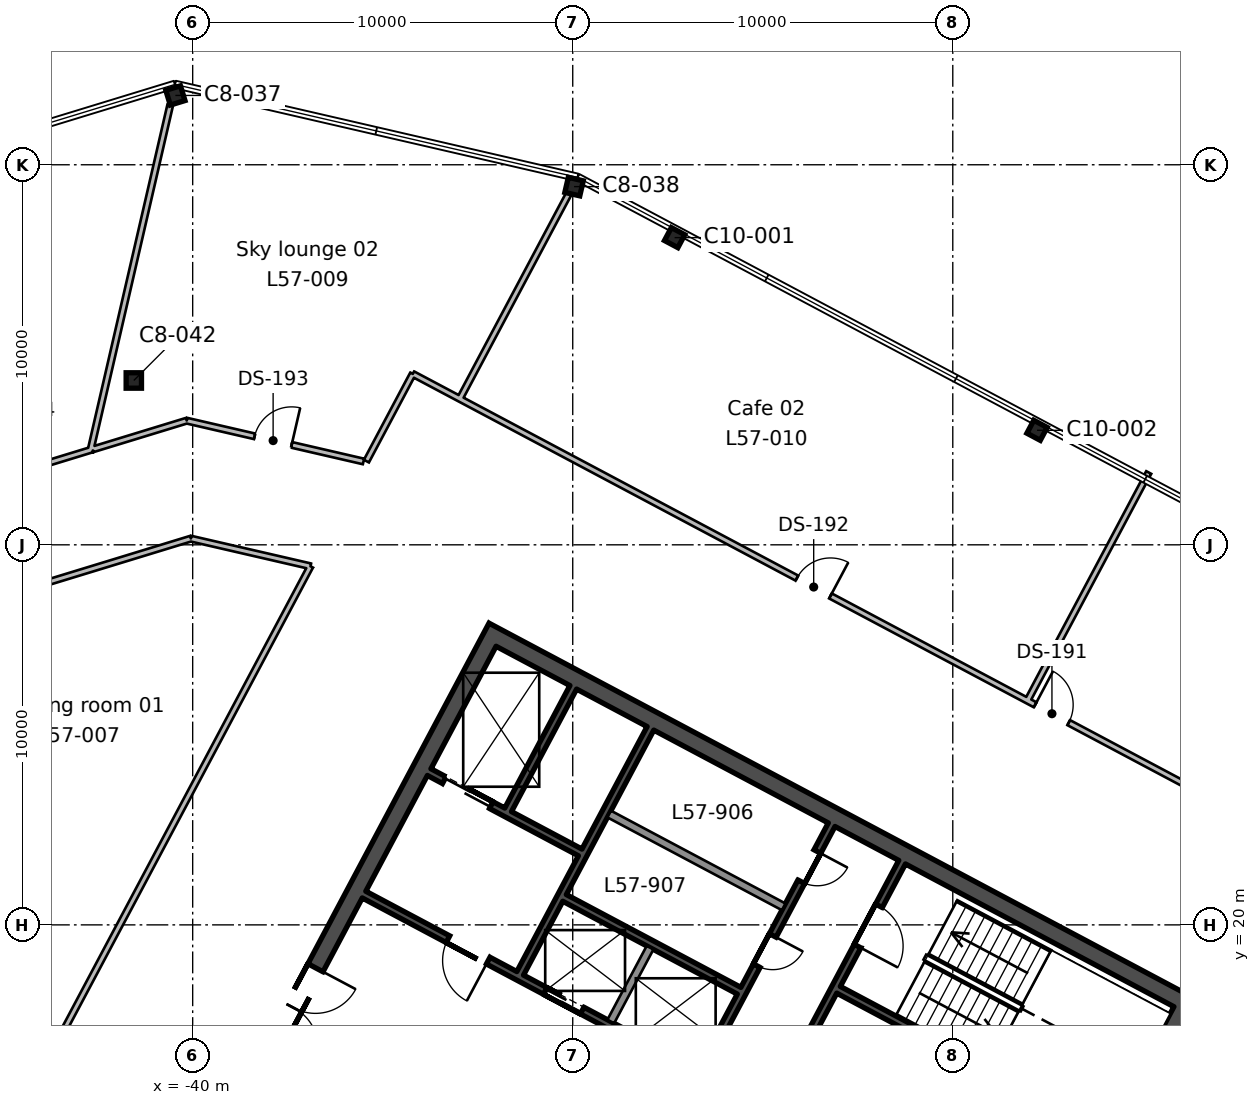
"""IFC4 building model, lengths in metres.
Left out: names, types, materials, properties, quantities, classifications, styles, units other than length and angle.
Written with IfcOpenShell. Run it as: python <this file> out.ifc"""

import sys

from ifc_helpers import new_model, si_unit, direction, frame, frame_2d, origin, origin_2d, place, context, subcontext, project, spatial, rectangle, i_section, extrude, element, fill, save


model = new_model("IFC4")
c1 = context("Model", 3, precision=1e-05, world=origin(), true_north=direction((0.0, 1.0)))
c2 = subcontext(c1, "Body", "Model", "MODEL_VIEW")
j1 = project(units=[si_unit("LENGTHUNIT", "METRE"), si_unit("PLANEANGLEUNIT", "RADIAN")], contexts=[c1])
p1 = place(None, origin())
s1 = spatial("IfcSite", under=j1, at=p1, CompositionType="ELEMENT")
p2 = place(p1, origin())
s2 = spatial("IfcBuilding", under=s1, at=p2, CompositionType="ELEMENT")
p3 = place(p2, frame((0.0, 0.0, 258.0)))
s3 = spatial("IfcBuildingStorey", under=s2, at=p3, CompositionType="ELEMENT", Elevation=258.0)
p4 = place(p3, frame((-17.783, 33.013, 0.0), z_axis=(0.0, 0.0, 1.0), x_axis=(-0.882947592859, 0.469471562786, 0.0)))
e1 = element("IfcColumn", 1, at=p4, inside=s3, PredefinedType="COLUMN", context=c2, shape_type="SweptSolid", body=[
    extrude(i_section(OverallWidth=0.399, OverallDepth=0.386, WebThickness=0.021, FlangeThickness=0.033, FilletRadius=0.015, at=origin_2d()), origin(), (0.0, 0.0, 1.0), 3.9),
])
p5 = place(p3, frame((-41.549, 34.324, 0.0), z_axis=(0.0, 0.0, 1.0), x_axis=(1.0, 0.0, 0.0)))
e2 = element("IfcColumn", 2, at=p5, inside=s3, PredefinedType="COLUMN", context=c2, shape_type="SweptSolid", body=[
    extrude(i_section(OverallWidth=0.404, OverallDepth=0.406, WebThickness=0.027, FlangeThickness=0.044, FilletRadius=0.015, at=origin_2d()), origin(), (0.0, 0.0, 1.0), 3.9),
])
p6 = place(p3, frame((-27.319, 38.083, 0.0), z_axis=(0.0, 0.0, 1.0), x_axis=(-0.882947592859, 0.469471562786, 0.0)))
e3 = element("IfcColumn", 3, at=p6, inside=s3, PredefinedType="COLUMN", context=c2, shape_type="SweptSolid", body=[
    extrude(i_section(OverallWidth=0.399, OverallDepth=0.386, WebThickness=0.021, FlangeThickness=0.033, FilletRadius=0.015, at=origin_2d()), origin(), (0.0, 0.0, 1.0), 3.9),
])
for number, where, z_axis, x_axis in (
    (4, (-29.965, 39.425, 0.0), (0.0, 0.0, 1.0), (-0.974, 0.225, 0.0)),
    (5, (-40.455, 41.824, 0.0), (0.0, 0.0, 1.0), (-0.956, -0.292, 0.0)),
):
    element("IfcColumn", number, at=place(p3, frame(where, z_axis=z_axis, x_axis=x_axis)), inside=s3, PredefinedType="COLUMN", context=c2, shape_type="SweptSolid", body=[
        extrude(i_section(OverallWidth=0.404, OverallDepth=0.406, WebThickness=0.027, FlangeThickness=0.044, FilletRadius=0.015, at=origin_2d()), origin(), (0.0, 0.0, 1.0), 3.9),
    ])
p7 = place(p3, frame((-13.771, 18.138, 0.0), z_axis=(0.0, 0.0, 1.0), x_axis=(-0.469467968382, -0.882949504028, 0.0)))
e6 = element("IfcWall", 6, at=p7, inside=s3, PredefinedType="SHEAR", context=c2, shape_type="SweptSolid", body=[
    extrude(rectangle(XDim=19.1, YDim=0.45, at=frame_2d((9.55, 0.0))), origin(), (0.0, 0.0, 1.0), 3.9),
])
p8 = place(p7, frame((6.55, 0.0, 0.0)))
e7 = element("IfcOpeningElement", 7, at=p8, cuts=e6, PredefinedType="OPENING", context=c2, shape_type="SweptSolid", body=[
    extrude(rectangle(XDim=2.4, YDim=2.4, at=frame_2d((1.2, 1.2))), frame((0.0, 0.235, 0.0), z_axis=(0.0, -1.0, 0.0), x_axis=(1.0, 0.0, 0.0)), (0.0, 0.0, 1.0), 0.47),
])
p9 = place(p3, frame((-32.004, 27.833, 0.0), z_axis=(0.0, 0.0, 1.0), x_axis=(-0.469467968382, -0.882949504028, 0.0)))
e8 = element("IfcWall", 8, at=p9, inside=s3, PredefinedType="SHEAR", context=c2, shape_type="SweptSolid", body=[
    extrude(rectangle(XDim=19.1, YDim=0.45, at=frame_2d((9.55, 0.0))), origin(), (0.0, 0.0, 1.0), 3.9),
])
p10 = place(p9, frame((10.15, 0.0, 0.0)))
e9 = element("IfcOpeningElement", 9, at=p10, cuts=e8, PredefinedType="OPENING", context=c2, shape_type="SweptSolid", body=[
    extrude(rectangle(XDim=2.4, YDim=2.4, at=frame_2d((1.2, 1.2))), frame((0.0, 0.235, 0.0), z_axis=(0.0, -1.0, 0.0), x_axis=(1.0, 0.0, 0.0)), (0.0, 0.0, 1.0), 0.47),
])
p11 = place(p3, frame((-14.076, 18.045, 0.0), z_axis=(0.0, 0.0, 1.0), x_axis=(-0.882947755831, 0.46947125628, 0.0)))
e10 = element("IfcWall", 10, at=p11, inside=s3, PredefinedType="SHEAR", context=c2, shape_type="SweptSolid", body=[
    extrude(rectangle(XDim=20.2, YDim=0.45, at=frame_2d((10.1, 0.0))), origin(), (0.0, 0.0, 1.0), 3.9),
])
p12 = place(p3, frame((-21.333, 21.649, 0.0), z_axis=(0.0, 0.0, 1.0), x_axis=(-0.469494272526, -0.882935517501, 0.0)))
e11 = element("IfcWall", 11, at=p12, inside=s3, PredefinedType="SHEAR", context=c2, shape_type="SweptSolid", body=[
    extrude(rectangle(XDim=7.3, YDim=0.2, at=frame_2d((3.65, 0.0))), origin(), (0.0, 0.0, 1.0), 3.9),
])
p13 = place(p12, frame((1.3, 0.0, 0.0)))
e12 = element("IfcOpeningElement", 12, at=p13, cuts=e11, PredefinedType="OPENING", context=c2, shape_type="SweptSolid", body=[
    extrude(rectangle(XDim=1.2, YDim=2.1, at=frame_2d((0.6, 1.05))), frame((0.0, 0.11, 0.0), z_axis=(0.0, -1.0, 0.0), x_axis=(1.0, 0.0, 0.0)), (0.0, 0.0, 1.0), 0.22),
])
p14 = place(p3, frame((-23.188, 22.635, 0.0), z_axis=(0.0, 0.0, 1.0), x_axis=(-0.469454336211, -0.882956752176, 0.0)))
e13 = element("IfcWall", 13, at=p14, inside=s3, PredefinedType="SHEAR", context=c2, shape_type="SweptSolid", body=[
    extrude(rectangle(XDim=7.3, YDim=0.2, at=frame_2d((3.65, 0.0))), origin(), (0.0, 0.0, 1.0), 3.9),
])
p15 = place(p14, frame((0.8, 0.0, 0.0)))
e14 = element("IfcOpeningElement", 14, at=p15, cuts=e13, PredefinedType="OPENING", context=c2, shape_type="SweptSolid", body=[
    extrude(rectangle(XDim=0.9, YDim=2.1, at=frame_2d((0.45, 1.05))), frame((0.0, 0.11, 0.0), z_axis=(0.0, -1.0, 0.0), x_axis=(1.0, 0.0, 0.0)), (0.0, 0.0, 1.0), 0.22),
])
p16 = place(p14, frame((3.3, 0.0, 0.0)))
e15 = element("IfcOpeningElement", 15, at=p16, cuts=e13, PredefinedType="OPENING", context=c2, shape_type="SweptSolid", body=[
    extrude(rectangle(XDim=0.9, YDim=2.1, at=frame_2d((0.45, 1.05))), frame((0.0, 0.11, 0.0), z_axis=(0.0, -1.0, 0.0), x_axis=(1.0, 0.0, 0.0)), (0.0, 0.0, 1.0), 0.22),
])
p17 = place(p3, frame((-27.966, 19.4, 0.0), z_axis=(0.0, 0.0, 1.0), x_axis=(-0.4694473164, -0.882960484464, 0.0)))
e16 = element("IfcWall", 16, at=p17, inside=s3, PredefinedType="SOLIDWALL", context=c2, shape_type="SweptSolid", body=[
    extrude(rectangle(XDim=2.2, YDim=0.2, at=frame_2d((1.1, 0.0))), origin(), (0.0, 0.0, 1.0), 3.9),
])
p18 = place(p3, frame((-27.955, 25.171, 0.0), z_axis=(0.0, 0.0, 1.0), x_axis=(-0.469480409012, -0.88294288918, 0.0)))
e17 = element("IfcWall", 17, at=p18, inside=s3, PredefinedType="SHEAR", context=c2, shape_type="SweptSolid", body=[
    extrude(rectangle(XDim=7.3, YDim=0.2, at=frame_2d((3.65, 0.0))), origin(), (0.0, 0.0, 1.0), 3.9),
])
p19 = place(p3, frame((-29.986, 26.25, 0.0), z_axis=(0.0, 0.0, 1.0), x_axis=(-0.469494272526, -0.882935517501, 0.0)))
e18 = element("IfcWall", 18, at=p19, inside=s3, PredefinedType="SHEAR", context=c2, shape_type="SweptSolid", body=[
    extrude(rectangle(XDim=3.65, YDim=0.2, at=frame_2d((1.825, 0.0))), origin(), (0.0, 0.0, 1.0), 3.9),
])
p20 = place(p3, frame((-24.449, 20.475, 0.0), z_axis=(0.0, 0.0, 1.0), x_axis=(-0.882934506056, 0.469496174655, 0.0)))
e19 = element("IfcWall", 19, at=p20, inside=s3, PredefinedType="SOLIDWALL", context=c2, shape_type="SweptSolid", body=[
    extrude(rectangle(XDim=5.2, YDim=0.2, at=frame_2d((2.6, 0.0))), origin(), (0.0, 0.0, 1.0), 3.9),
])
p21 = place(p3, frame((-15.942, 14.536, 0.0), z_axis=(0.0, 0.0, 1.0), x_axis=(-0.882946947542, 0.469472776449, 0.0)))
e20 = element("IfcWall", 20, at=p21, inside=s3, PredefinedType="SHEAR", context=c2, shape_type="SweptSolid", body=[
    extrude(rectangle(XDim=8.0, YDim=0.2, at=frame_2d((4.0, 0.0))), origin(), (0.0, 0.0, 1.0), 3.9),
])
p22 = place(p3, frame((-29.804, 21.906, 0.0), z_axis=(0.0, 0.0, 1.0), x_axis=(-0.882960433586, 0.469447412093, 0.0)))
e21 = element("IfcWall", 21, at=p22, inside=s3, PredefinedType="SHEAR", context=c2, shape_type="SweptSolid", body=[
    extrude(rectangle(XDim=4.5, YDim=0.2, at=frame_2d((2.25, 0.0))), origin(), (0.0, 0.0, 1.0), 3.9),
])
p23 = place(p22, frame((2.65, 0.0, 0.0)))
e22 = element("IfcOpeningElement", 22, at=p23, cuts=e21, PredefinedType="OPENING", context=c2, shape_type="SweptSolid", body=[
    extrude(rectangle(XDim=1.4, YDim=2.4, at=frame_2d((0.7, 1.2))), frame((0.0, 0.11, 0.0), z_axis=(0.0, -1.0, 0.0), x_axis=(1.0, 0.0, 0.0)), (0.0, 0.0, 1.0), 0.22),
])
p24 = place(p3, frame((-25.623, 18.268, 0.0), z_axis=(0.0, 0.0, 1.0), x_axis=(-0.882953967957, 0.469459572775, 0.0)))
e23 = element("IfcWall", 23, at=p24, inside=s3, PredefinedType="SHEAR", context=c2, shape_type="SweptSolid", body=[
    extrude(rectangle(XDim=5.2, YDim=0.2, at=frame_2d((2.6, 0.0))), origin(), (0.0, 0.0, 1.0), 3.9),
])
p25 = place(p3, frame((-26.662, 16.102, 0.0), z_axis=(0.0, 0.0, 1.0), x_axis=(-0.882940221191, 0.469485426614, 0.0)))
e24 = element("IfcWall", 24, at=p25, inside=s3, PredefinedType="SHEAR", context=c2, shape_type="SweptSolid", body=[
    extrude(rectangle(XDim=10.0, YDim=0.2, at=frame_2d((5.0, 0.0))), origin(), (0.0, 0.0, 1.0), 3.9),
])
p26 = place(p25, frame((6.3, 0.0, 0.0)))
e25 = element("IfcOpeningElement", 25, at=p26, cuts=e24, PredefinedType="OPENING", context=c2, shape_type="SweptSolid", body=[
    extrude(rectangle(XDim=1.2, YDim=2.1, at=frame_2d((0.6, 1.05))), frame((0.0, 0.11, 0.0), z_axis=(0.0, -1.0, 0.0), x_axis=(1.0, 0.0, 0.0)), (0.0, 0.0, 1.0), 0.22),
])
p27 = place(p25, frame((0.8, 0.0, 0.0)))
e26 = element("IfcOpeningElement", 26, at=p27, cuts=e24, PredefinedType="OPENING", context=c2, shape_type="SweptSolid", body=[
    extrude(rectangle(XDim=1.1, YDim=2.1, at=frame_2d((0.55, 1.05))), frame((0.0, 0.11, 0.0), z_axis=(0.0, -1.0, 0.0), x_axis=(1.0, 0.0, 0.0)), (0.0, 0.0, 1.0), 0.22),
])
p28 = place(p25, frame((3.5, 0.0, 0.0)))
e27 = element("IfcOpeningElement", 27, at=p28, cuts=e24, PredefinedType="OPENING", context=c2, shape_type="SweptSolid", body=[
    extrude(rectangle(XDim=1.1, YDim=2.1, at=frame_2d((0.55, 1.05))), frame((0.0, 0.11, 0.0), z_axis=(0.0, -1.0, 0.0), x_axis=(1.0, 0.0, 0.0)), (0.0, 0.0, 1.0), 0.22),
])
p29 = place(p3, frame((-42.639, 32.509, 0.0), z_axis=(0.0, 0.0, 1.0), x_axis=(-0.956263759499, -0.292505764504, 0.0)))
e28 = element("IfcWall", 28, at=p29, inside=s3, PredefinedType="PARTITIONING", context=c2, shape_type="SweptSolid", body=[
    extrude(rectangle(XDim=3.692, YDim=0.15, at=frame_2d((1.846, 0.0))), origin(), (0.0, 0.0, 1.0), 3.54),
])
p30 = place(p29, frame((1.475, 0.0, 0.0)))
e29 = element("IfcOpeningElement", 29, at=p30, cuts=e28, PredefinedType="OPENING", context=c2, shape_type="SweptSolid", body=[
    extrude(rectangle(XDim=1.0, YDim=2.1, at=frame_2d((0.5, 1.05))), frame((0.0, 0.085, 0.0), z_axis=(0.0, -1.0, 0.0), x_axis=(1.0, 0.0, 0.0)), (0.0, 0.0, 1.0), 0.17),
])
p31 = place(p3, frame((-40.59, 41.575, 0.0), z_axis=(0.0, 0.0, 1.0), x_axis=(-0.22489203073, -0.974383689577, 0.0)))
e30 = element("IfcWall", 30, at=p31, inside=s3, PredefinedType="PARTITIONING", context=c2, shape_type="SweptSolid", body=[
    extrude(rectangle(XDim=9.32, YDim=0.15, at=frame_2d((4.66, 0.0))), origin(), (0.0, 0.0, 1.0), 3.54),
])
p32 = place(p3, frame((-35.505, 32.193, 0.0), z_axis=(0.0, 0.0, 1.0), x_axis=(-0.974367056683, 0.22496408347, 0.0)))
e31 = element("IfcWall", 31, at=p32, inside=s3, PredefinedType="PARTITIONING", context=c2, shape_type="SweptSolid", body=[
    extrude(rectangle(XDim=4.774, YDim=0.15, at=frame_2d((2.387, 0.0))), origin(), (0.0, 0.0, 1.0), 3.54),
])
p33 = place(p32, frame((1.94, 0.0, 0.0)))
e32 = element("IfcOpeningElement", 32, at=p33, cuts=e31, PredefinedType="OPENING", context=c2, shape_type="SweptSolid", body=[
    extrude(rectangle(XDim=1.0, YDim=2.1, at=frame_2d((0.5, 1.05))), frame((0.0, 0.085, 0.0), z_axis=(0.0, -1.0, 0.0), x_axis=(1.0, 0.0, 0.0)), (0.0, 0.0, 1.0), 0.17),
])
p34 = place(p3, frame((-40.157, 33.267, 0.0), z_axis=(0.0, 0.0, 1.0), x_axis=(-0.956265748616, -0.292499261577, 0.0)))
e33 = element("IfcWall", 33, at=p34, inside=s3, PredefinedType="PARTITIONING", context=c2, shape_type="SweptSolid", body=[
    extrude(rectangle(XDim=2.585, YDim=0.15, at=frame_2d((1.292, 0.0))), origin(), (0.0, 0.0, 1.0), 3.54),
])
p35 = place(p3, frame((-32.975, 33.842, 0.0), z_axis=(0.0, 0.0, 1.0), x_axis=(-0.88325597014, 0.46889112938, 0.0)))
e34 = element("IfcWall", 34, at=p35, inside=s3, PredefinedType="PARTITIONING", context=c2, shape_type="SweptSolid", body=[
    extrude(rectangle(XDim=1.397, YDim=0.15, at=frame_2d((0.698, 0.0))), origin(), (0.0, 0.0, 1.0), 3.54),
])
p36 = place(p3, frame((-35.429, 32.202, 0.0), z_axis=(0.0, 0.0, 1.0), x_axis=(0.469491528043, 0.882936976854, 0.0)))
e35 = element("IfcWall", 35, at=p36, inside=s3, PredefinedType="PARTITIONING", context=c2, shape_type="SweptSolid", body=[
    extrude(rectangle(XDim=2.601, YDim=0.15, at=frame_2d((1.3, 0.0))), origin(), (0.0, 0.0, 1.0), 3.54),
])
p37 = place(p3, frame((-32.975, 33.842, 0.0), z_axis=(0.0, 0.0, 1.0), x_axis=(0.882957739094, -0.469452479995, 0.0)))
e36 = element("IfcWall", 36, at=p37, inside=s3, PredefinedType="PARTITIONING", context=c2, shape_type="SweptSolid", body=[
    extrude(rectangle(XDim=21.016, YDim=0.15, at=frame_2d((10.508, 0.0))), origin(), (0.0, 0.0, 1.0), 3.54),
])
p38 = place(p37, frame((17.15, 0.0, 0.0)))
e37 = element("IfcOpeningElement", 37, at=p38, cuts=e36, PredefinedType="OPENING", context=c2, shape_type="SweptSolid", body=[
    extrude(rectangle(XDim=1.0, YDim=2.1, at=frame_2d((0.5, 1.05))), frame((0.0, 0.085, 0.0), z_axis=(0.0, -1.0, 0.0), x_axis=(1.0, 0.0, 0.0)), (0.0, 0.0, 1.0), 0.17),
])
p39 = place(p37, frame((10.05, 0.0, 0.0)))
e38 = element("IfcOpeningElement", 38, at=p39, cuts=e36, PredefinedType="OPENING", context=c2, shape_type="SweptSolid", body=[
    extrude(rectangle(XDim=1.0, YDim=2.1, at=frame_2d((0.5, 1.05))), frame((0.0, 0.085, 0.0), z_axis=(0.0, -1.0, 0.0), x_axis=(1.0, 0.0, 0.0)), (0.0, 0.0, 1.0), 0.17),
])
p40 = place(p3, frame((-30.098, 39.247, 0.0), z_axis=(0.0, 0.0, 1.0), x_axis=(-0.469420518513, -0.882974731688, 0.0)))
e39 = element("IfcWall", 39, at=p40, inside=s3, PredefinedType="PARTITIONING", context=c2, shape_type="SweptSolid", body=[
    extrude(rectangle(XDim=6.123, YDim=0.15, at=frame_2d((3.061, 0.0))), origin(), (0.0, 0.0, 1.0), 3.54),
])
p41 = place(p3, frame((-14.844, 31.903, 0.0), z_axis=(0.0, 0.0, 1.0), x_axis=(-0.469294360179, -0.88304179035, 0.0)))
e40 = element("IfcWall", 40, at=p41, inside=s3, PredefinedType="PARTITIONING", context=c2, shape_type="SweptSolid", body=[
    extrude(rectangle(XDim=6.799, YDim=0.15, at=frame_2d((3.4, 0.0))), origin(), (0.0, 0.0, 1.0), 3.54),
])
p42 = place(p3, frame((-14.419, 23.976, 0.0), z_axis=(0.0, 0.0, 1.0), x_axis=(0.88291475538, -0.469533315891, 0.0)))
e41 = element("IfcWall", 41, at=p42, inside=s3, PredefinedType="PARTITIONING", context=c2, shape_type="SweptSolid", body=[
    extrude(rectangle(XDim=8.387, YDim=0.15, at=frame_2d((4.193, 0.0))), origin(), (0.0, 0.0, 1.0), 3.54),
])
p43 = place(p3, frame((-44.524, 28.795, 0.0), z_axis=(0.0, 0.0, 1.0), x_axis=(0.956318764789, 0.292325879991, 0.0)))
e42 = element("IfcWall", 42, at=p43, inside=s3, PredefinedType="PARTITIONING", context=c2, shape_type="SweptSolid", body=[
    extrude(rectangle(XDim=4.68, YDim=0.15, at=frame_2d((2.34, 0.0))), origin(), (0.0, 0.0, 1.0), 3.54),
])
p44 = place(p3, frame((-40.048, 30.163, 0.0), z_axis=(0.0, 0.0, 1.0), x_axis=(0.974354251236, -0.22501953937, 0.0)))
e43 = element("IfcWall", 43, at=p44, inside=s3, PredefinedType="PARTITIONING", context=c2, shape_type="SweptSolid", body=[
    extrude(rectangle(XDim=3.231, YDim=0.15, at=frame_2d((1.615, 0.0))), origin(), (0.0, 0.0, 1.0), 3.54),
])
p45 = place(p3, frame((-36.9, 29.436, 0.0), z_axis=(0.0, 0.0, 1.0), x_axis=(-0.469489871427, -0.882937857739, 0.0)))
e44 = element("IfcWall", 44, at=p45, inside=s3, PredefinedType="PARTITIONING", context=c2, shape_type="SweptSolid", body=[
    extrude(rectangle(XDim=17.334, YDim=0.15, at=frame_2d((8.667, 0.0))), origin(), (0.0, 0.0, 1.0), 3.54),
])
p46 = place(p10, origin())
e45 = element("IfcDoor", 45, at=p46, inside=s3, OperationType="DOUBLE_DOOR_SINGLE_SWING", PredefinedType="DOOR", context=c2, shape_type="SweptSolid", body=[
    extrude(rectangle(XDim=2.4, YDim=2.4, at=frame_2d((1.2, 1.2))), frame((0.0, 0.025, 0.0), z_axis=(0.0, -1.0, 0.0), x_axis=(1.0, 0.0, 0.0)), (0.0, 0.0, 1.0), 0.05),
])
fill(e9, e45)
p47 = place(p26, origin())
e46 = element("IfcDoor", 46, at=p47, inside=s3, OperationType="SINGLE_SWING_LEFT", PredefinedType="DOOR", context=c2, shape_type="SweptSolid", body=[
    extrude(rectangle(XDim=1.2, YDim=2.1, at=frame_2d((0.6, 1.05))), frame((0.0, 0.025, 0.0), z_axis=(0.0, -1.0, 0.0), x_axis=(1.0, 0.0, 0.0)), (0.0, 0.0, 1.0), 0.05),
])
fill(e25, e46)
p48 = place(p13, origin())
e47 = element("IfcDoor", 47, at=p48, inside=s3, OperationType="SINGLE_SWING_RIGHT", PredefinedType="DOOR", context=c2, shape_type="SweptSolid", body=[
    extrude(rectangle(XDim=1.2, YDim=2.1, at=frame_2d((0.6, 1.05))), frame((0.0, 0.025, 0.0), z_axis=(0.0, -1.0, 0.0), x_axis=(1.0, 0.0, 0.0)), (0.0, 0.0, 1.0), 0.05),
])
fill(e12, e47)
p49 = place(p28, origin())
e48 = element("IfcDoor", 48, at=p49, inside=s3, OperationType="DOUBLE_DOOR_SLIDING", PredefinedType="DOOR", context=c2, shape_type="SweptSolid", body=[
    extrude(rectangle(XDim=1.1, YDim=2.1, at=frame_2d((0.55, 1.05))), frame((0.0, 0.025, 0.0), z_axis=(0.0, -1.0, 0.0), x_axis=(1.0, 0.0, 0.0)), (0.0, 0.0, 1.0), 0.05),
])
fill(e27, e48)
p50 = place(p23, origin())
e49 = element("IfcDoor", 49, at=p50, inside=s3, OperationType="DOUBLE_DOOR_SLIDING", PredefinedType="DOOR", context=c2, shape_type="SweptSolid", body=[
    extrude(rectangle(XDim=1.4, YDim=2.4, at=frame_2d((0.7, 1.2))), frame((0.0, 0.025, 0.0), z_axis=(0.0, -1.0, 0.0), x_axis=(1.0, 0.0, 0.0)), (0.0, 0.0, 1.0), 0.05),
])
fill(e22, e49)
p51 = place(p15, origin())
e50 = element("IfcDoor", 50, at=p51, inside=s3, OperationType="SINGLE_SWING_LEFT", PredefinedType="DOOR", context=c2, shape_type="SweptSolid", body=[
    extrude(rectangle(XDim=0.9, YDim=2.1, at=frame_2d((0.45, 1.05))), frame((0.0, 0.025, 0.0), z_axis=(0.0, -1.0, 0.0), x_axis=(1.0, 0.0, 0.0)), (0.0, 0.0, 1.0), 0.05),
])
fill(e14, e50)
p52 = place(p16, origin())
e51 = element("IfcDoor", 51, at=p52, inside=s3, OperationType="SINGLE_SWING_LEFT", PredefinedType="DOOR", context=c2, shape_type="SweptSolid", body=[
    extrude(rectangle(XDim=0.9, YDim=2.1, at=frame_2d((0.45, 1.05))), frame((0.0, 0.025, 0.0), z_axis=(0.0, -1.0, 0.0), x_axis=(1.0, 0.0, 0.0)), (0.0, 0.0, 1.0), 0.05),
])
fill(e15, e51)
p53 = place(p38, origin())
e52 = element("IfcDoor", 52, at=p53, inside=s3, OperationType="SINGLE_SWING_LEFT", PredefinedType="DOOR", context=c2, shape_type="SweptSolid", body=[
    extrude(rectangle(XDim=1.0, YDim=2.1, at=frame_2d((0.5, 1.05))), frame((0.0, 0.025, 0.0), z_axis=(0.0, -1.0, 0.0), x_axis=(1.0, 0.0, 0.0)), (0.0, 0.0, 1.0), 0.05),
])
fill(e37, e52)
p54 = place(p39, origin())
e53 = element("IfcDoor", 53, at=p54, inside=s3, OperationType="SINGLE_SWING_RIGHT", PredefinedType="DOOR", context=c2, shape_type="SweptSolid", body=[
    extrude(rectangle(XDim=1.0, YDim=2.1, at=frame_2d((0.5, 1.05))), frame((0.0, 0.025, 0.0), z_axis=(0.0, -1.0, 0.0), x_axis=(1.0, 0.0, 0.0)), (0.0, 0.0, 1.0), 0.05),
])
fill(e38, e53)
p55 = place(p33, frame((1.0, 0.0, 0.0), z_axis=(0.0, 0.0, 1.0), x_axis=(-1.0, 0.0, 0.0)))
e54 = element("IfcDoor", 54, at=p55, inside=s3, OperationType="SINGLE_SWING_RIGHT", PredefinedType="DOOR", context=c2, shape_type="SweptSolid", body=[
    extrude(rectangle(XDim=1.0, YDim=2.1, at=frame_2d((0.5, 1.05))), frame((0.0, 0.025, 0.0), z_axis=(0.0, -1.0, 0.0), x_axis=(1.0, 0.0, 0.0)), (0.0, 0.0, 1.0), 0.05),
])
fill(e32, e54)
save(model, sys.argv[1])
